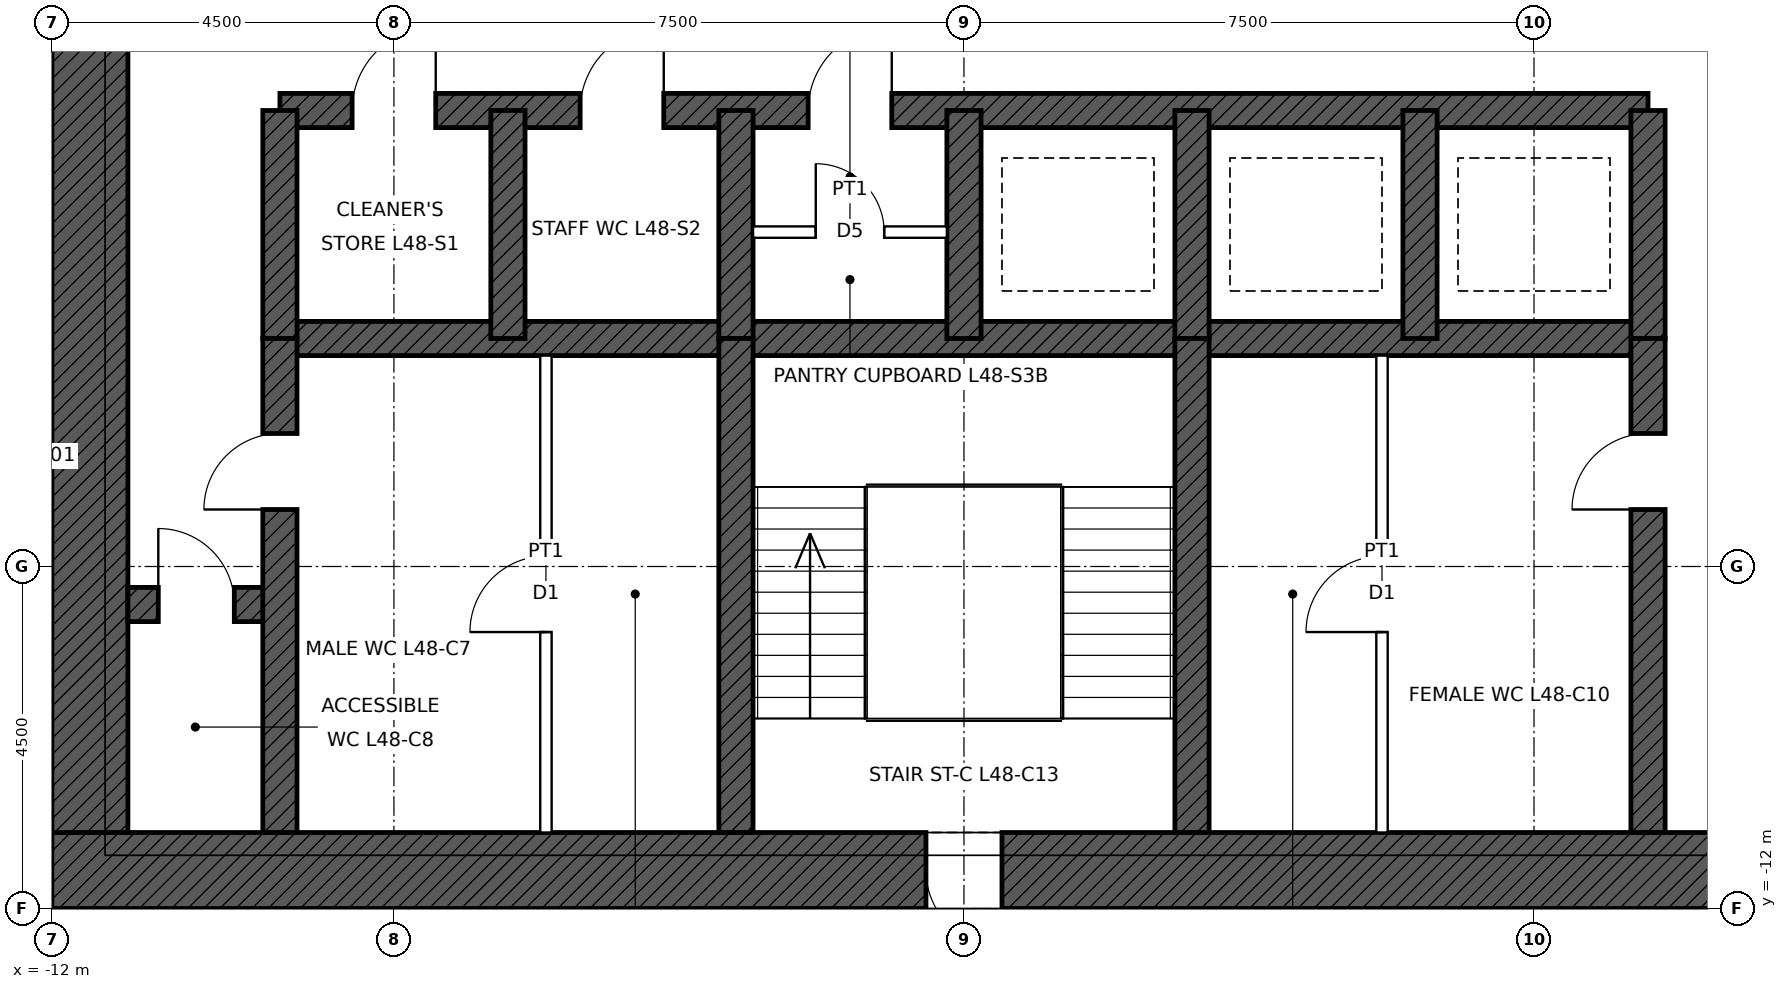
"""IFC4 building model, lengths in metres.
Left out: names, types, materials, properties, quantities, classifications, styles, units other than length and angle.
Written with IfcOpenShell. Run it as: python <this file> out.ifc"""

import sys

from ifc_helpers import new_model, si_unit, direction, frame, frame_2d, origin, place, context, subcontext, project, spatial, rectangle, extrude, element, fill, save


model = new_model("IFC4")
c1 = context("Model", 3, precision=1e-05, world=origin(), true_north=direction((0.0, 1.0)))
c2 = subcontext(c1, "Body", "Model", "MODEL_VIEW")
j1 = project(units=[si_unit("LENGTHUNIT", "METRE"), si_unit("PLANEANGLEUNIT", "RADIAN")], contexts=[c1])
p1 = place(None, origin())
s1 = spatial("IfcSite", under=j1, at=p1, CompositionType="ELEMENT")
p2 = place(p1, origin())
s2 = spatial("IfcBuilding", under=s1, at=p2, CompositionType="ELEMENT")
p3 = place(p2, frame((0.0, 0.0, 225.9)))
s3 = spatial("IfcBuildingStorey", under=s2, at=p3, CompositionType="ELEMENT", Elevation=225.9)
p4 = place(p3, frame((12.0, -11.5, 0.0), z_axis=(0.0, 0.0, 1.0), x_axis=(-1.0, 0.0, 0.0)))
e1 = element("IfcWall", 1, at=p4, inside=s3, PredefinedType="SHEAR", context=c2, shape_type="SweptSolid", body=[
    extrude(rectangle(XDim=24.0, YDim=1.0, at=frame_2d((12.0, 0.0))), origin(), (0.0, 0.0, 1.0), 4.0),
])
p5 = place(p4, frame((11.5, 0.0, 0.0)))
e2 = element("IfcOpeningElement", 2, at=p5, cuts=e1, PredefinedType="OPENING", context=c2, shape_type="SweptSolid", body=[
    extrude(rectangle(XDim=1.0, YDim=2.1, at=frame_2d((0.5, 1.05))), frame((0.0, 0.51, 0.0), z_axis=(0.0, -1.0, 0.0), x_axis=(1.0, 0.0, 0.0)), (0.0, 0.0, 1.0), 1.02),
])
p6 = place(p4, frame((1.0, 0.0, 0.0)))
e3 = element("IfcOpeningElement", 3, at=p6, cuts=e1, PredefinedType="OPENING", context=c2, shape_type="SweptSolid", body=[
    extrude(rectangle(XDim=1.0, YDim=2.4, at=frame_2d((0.5, 1.2))), frame((0.0, 0.51, 0.0), z_axis=(0.0, -1.0, 0.0), x_axis=(1.0, 0.0, 0.0)), (0.0, 0.0, 1.0), 1.02),
])
p7 = place(p3, frame((-11.5, -11.0, 0.0), z_axis=(0.0, 0.0, 1.0), x_axis=(0.0, 1.0, 0.0)))
e4 = element("IfcWall", 4, at=p7, inside=s3, PredefinedType="SHEAR", context=c2, shape_type="SweptSolid", body=[
    extrude(rectangle(XDim=22.0, YDim=1.0, at=frame_2d((11.0, 0.0))), origin(), (0.0, 0.0, 1.0), 4.0),
])
p8 = place(p7, frame((10.5, 0.0, 0.0)))
e5 = element("IfcOpeningElement", 5, at=p8, cuts=e4, PredefinedType="OPENING", context=c2, shape_type="SweptSolid", body=[
    extrude(rectangle(XDim=1.0, YDim=2.4, at=frame_2d((0.5, 1.2))), frame((0.0, 0.51, 0.0), z_axis=(0.0, -1.0, 0.0), x_axis=(1.0, 0.0, 0.0)), (0.0, 0.0, 1.0), 1.02),
])
p9 = place(p3, frame((-9.0, -1.5, 0.0), z_axis=(0.0, 0.0, 1.0), x_axis=(1.0, 0.0, 0.0)))
e6 = element("IfcWall", 6, at=p9, inside=s3, PredefinedType="SHEAR", context=c2, shape_type="SweptSolid", body=[
    extrude(rectangle(XDim=18.0, YDim=0.45, at=frame_2d((9.0, 0.0))), origin(), (0.0, 0.0, 1.0), 4.0),
])
p10 = place(p9, frame((0.95, 0.0, 0.0)))
e7 = element("IfcOpeningElement", 7, at=p10, cuts=e6, PredefinedType="OPENING", context=c2, shape_type="SweptSolid", body=[
    extrude(rectangle(XDim=1.1, YDim=2.1, at=frame_2d((0.55, 1.05))), frame((0.0, 0.235, 0.0), z_axis=(0.0, -1.0, 0.0), x_axis=(1.0, 0.0, 0.0)), (0.0, 0.0, 1.0), 0.47),
])
p11 = place(p9, frame((3.95, 0.0, 0.0)))
e8 = element("IfcOpeningElement", 8, at=p11, cuts=e6, PredefinedType="OPENING", context=c2, shape_type="SweptSolid", body=[
    extrude(rectangle(XDim=1.1, YDim=2.1, at=frame_2d((0.55, 1.05))), frame((0.0, 0.235, 0.0), z_axis=(0.0, -1.0, 0.0), x_axis=(1.0, 0.0, 0.0)), (0.0, 0.0, 1.0), 0.47),
])
p12 = place(p9, frame((6.95, 0.0, 0.0)))
e9 = element("IfcOpeningElement", 9, at=p12, cuts=e6, PredefinedType="OPENING", context=c2, shape_type="SweptSolid", body=[
    extrude(rectangle(XDim=1.1, YDim=2.1, at=frame_2d((0.55, 1.05))), frame((0.0, 0.235, 0.0), z_axis=(0.0, -1.0, 0.0), x_axis=(1.0, 0.0, 0.0)), (0.0, 0.0, 1.0), 0.47),
])
p13 = place(p3, frame((-9.0, -4.5, 0.0), z_axis=(0.0, 0.0, 1.0), x_axis=(1.0, 0.0, 0.0)))
e10 = element("IfcWall", 10, at=p13, inside=s3, PredefinedType="SHEAR", context=c2, shape_type="SweptSolid", body=[
    extrude(rectangle(XDim=18.0, YDim=0.45, at=frame_2d((9.0, 0.0))), origin(), (0.0, 0.0, 1.0), 4.0),
])
p14 = place(p3, frame((-11.0, -8.0, 0.0), z_axis=(0.0, 0.0, 1.0), x_axis=(1.0, 0.0, 0.0)))
e11 = element("IfcWall", 11, at=p14, inside=s3, PredefinedType="SHEAR", context=c2, shape_type="SweptSolid", body=[
    extrude(rectangle(XDim=2.0, YDim=0.45, at=frame_2d((1.0, 0.0))), origin(), (0.0, 0.0, 1.0), 4.0),
])
p15 = place(p14, frame((0.4, 0.0, 0.0)))
e12 = element("IfcOpeningElement", 12, at=p15, cuts=e11, PredefinedType="OPENING", context=c2, shape_type="SweptSolid", body=[
    extrude(rectangle(XDim=1.0, YDim=2.1, at=frame_2d((0.5, 1.05))), frame((0.0, 0.235, 0.0), z_axis=(0.0, -1.0, 0.0), x_axis=(1.0, 0.0, 0.0)), (0.0, 0.0, 1.0), 0.47),
])
for number, where, z_axis, x_axis in (
    (13, (-9.0, -4.5, 0.0), (0.0, 0.0, 1.0), (0.0, 1.0, 0.0)),
    (14, (9.0, -4.5, 0.0), (0.0, 0.0, 1.0), (0.0, 1.0, 0.0)),
    (15, (-6.0, -4.5, 0.0), (0.0, 0.0, 1.0), (0.0, 1.0, 0.0)),
    (16, (-3.0, -4.5, 0.0), (0.0, 0.0, 1.0), (0.0, 1.0, 0.0)),
    (17, (0.0, -4.5, 0.0), (0.0, 0.0, 1.0), (0.0, 1.0, 0.0)),
    (18, (3.0, -4.5, 0.0), (0.0, 0.0, 1.0), (0.0, 1.0, 0.0)),
    (19, (6.0, -4.5, 0.0), (0.0, 0.0, 1.0), (0.0, 1.0, 0.0)),
):
    element("IfcWall", number, at=place(p3, frame(where, z_axis=z_axis, x_axis=x_axis)), inside=s3, PredefinedType="SHEAR", context=c2, shape_type="SweptSolid", body=[
        extrude(rectangle(XDim=3.0, YDim=0.45, at=frame_2d((1.5, 0.0))), origin(), (0.0, 0.0, 1.0), 4.0),
    ])
p16 = place(p3, frame((-9.0, -11.0, 0.0), z_axis=(0.0, 0.0, 1.0), x_axis=(0.0, 1.0, 0.0)))
e20 = element("IfcWall", 20, at=p16, inside=s3, PredefinedType="SHEAR", context=c2, shape_type="SweptSolid", body=[
    extrude(rectangle(XDim=6.5, YDim=0.45, at=frame_2d((3.25, 0.0))), origin(), (0.0, 0.0, 1.0), 4.0),
])
p17 = place(p16, frame((4.25, 0.0, 0.0)))
e21 = element("IfcOpeningElement", 21, at=p17, cuts=e20, PredefinedType="OPENING", context=c2, shape_type="SweptSolid", body=[
    extrude(rectangle(XDim=1.0, YDim=2.1, at=frame_2d((0.5, 1.05))), frame((0.0, 0.235, 0.0), z_axis=(0.0, -1.0, 0.0), x_axis=(1.0, 0.0, 0.0)), (0.0, 0.0, 1.0), 0.47),
])
p18 = place(p3, frame((9.0, -11.0, 0.0), z_axis=(0.0, 0.0, 1.0), x_axis=(0.0, 1.0, 0.0)))
e22 = element("IfcWall", 22, at=p18, inside=s3, PredefinedType="SHEAR", context=c2, shape_type="SweptSolid", body=[
    extrude(rectangle(XDim=6.5, YDim=0.45, at=frame_2d((3.25, 0.0))), origin(), (0.0, 0.0, 1.0), 4.0),
])
p19 = place(p18, frame((4.25, 0.0, 0.0)))
e23 = element("IfcOpeningElement", 23, at=p19, cuts=e22, PredefinedType="OPENING", context=c2, shape_type="SweptSolid", body=[
    extrude(rectangle(XDim=1.0, YDim=2.1, at=frame_2d((0.5, 1.05))), frame((0.0, 0.235, 0.0), z_axis=(0.0, -1.0, 0.0), x_axis=(1.0, 0.0, 0.0)), (0.0, 0.0, 1.0), 0.47),
])
for number, where, z_axis, x_axis in (
    (24, (-3.0, -11.0, 0.0), (0.0, 0.0, 1.0), (0.0, 1.0, 0.0)),
    (25, (3.0, -11.0, 0.0), (0.0, 0.0, 1.0), (0.0, 1.0, 0.0)),
):
    element("IfcWall", number, at=place(p3, frame(where, z_axis=z_axis, x_axis=x_axis)), inside=s3, PredefinedType="SHEAR", context=c2, shape_type="SweptSolid", body=[
        extrude(rectangle(XDim=6.5, YDim=0.45, at=frame_2d((3.25, 0.0))), origin(), (0.0, 0.0, 1.0), 4.0),
    ])
p20 = place(p3, frame((-5.5, -11.0, 0.0), z_axis=(0.0, 0.0, 1.0), x_axis=(0.0, 1.0, 0.0)))
e26 = element("IfcWall", 26, at=p20, inside=s3, PredefinedType="PARTITIONING", context=c2, shape_type="SweptSolid", body=[
    extrude(rectangle(XDim=6.275, YDim=0.15, at=frame_2d((3.137, 0.0))), origin(), (0.0, 0.0, 1.0), 3.75),
])
p21 = place(p20, frame((2.637, 0.0, 0.0)))
e27 = element("IfcOpeningElement", 27, at=p21, cuts=e26, PredefinedType="OPENING", context=c2, shape_type="SweptSolid", body=[
    extrude(rectangle(XDim=1.0, YDim=2.1, at=frame_2d((0.5, 1.05))), frame((0.0, 0.085, 0.0), z_axis=(0.0, -1.0, 0.0), x_axis=(1.0, 0.0, 0.0)), (0.0, 0.0, 1.0), 0.17),
])
p22 = place(p3, frame((5.5, -11.0, 0.0), z_axis=(0.0, 0.0, 1.0), x_axis=(0.0, 1.0, 0.0)))
e28 = element("IfcWall", 28, at=p22, inside=s3, PredefinedType="PARTITIONING", context=c2, shape_type="SweptSolid", body=[
    extrude(rectangle(XDim=6.275, YDim=0.15, at=frame_2d((3.137, 0.0))), origin(), (0.0, 0.0, 1.0), 3.75),
])
p23 = place(p22, frame((2.637, 0.0, 0.0)))
e29 = element("IfcOpeningElement", 29, at=p23, cuts=e28, PredefinedType="OPENING", context=c2, shape_type="SweptSolid", body=[
    extrude(rectangle(XDim=1.0, YDim=2.1, at=frame_2d((0.5, 1.05))), frame((0.0, 0.085, 0.0), z_axis=(0.0, -1.0, 0.0), x_axis=(1.0, 0.0, 0.0)), (0.0, 0.0, 1.0), 0.17),
])
p24 = place(p3, frame((-2.775, -3.1, 0.0), z_axis=(0.0, 0.0, 1.0), x_axis=(1.0, 0.0, 0.0)))
e30 = element("IfcWall", 30, at=p24, inside=s3, PredefinedType="PARTITIONING", context=c2, shape_type="SweptSolid", body=[
    extrude(rectangle(XDim=2.55, YDim=0.15, at=frame_2d((1.275, 0.0))), origin(), (0.0, 0.0, 1.0), 3.75),
])
p25 = place(p24, frame((0.825, 0.0, 0.0)))
e31 = element("IfcOpeningElement", 31, at=p25, cuts=e30, PredefinedType="OPENING", context=c2, shape_type="SweptSolid", body=[
    extrude(rectangle(XDim=0.9, YDim=2.1, at=frame_2d((0.45, 1.05))), frame((0.0, 0.085, 0.0), z_axis=(0.0, -1.0, 0.0), x_axis=(1.0, 0.0, 0.0)), (0.0, 0.0, 1.0), 0.17),
])
p26 = place(p5, origin())
e32 = element("IfcDoor", 32, at=p26, inside=s3, OperationType="SINGLE_SWING_LEFT", PredefinedType="DOOR", context=c2, shape_type="SweptSolid", body=[
    extrude(rectangle(XDim=1.0, YDim=2.1, at=frame_2d((0.5, 1.05))), frame((0.0, 0.485, 0.0), z_axis=(0.0, -1.0, 0.0), x_axis=(1.0, 0.0, 0.0)), (0.0, 0.0, 1.0), 0.05),
])
fill(e2, e32)
p27 = place(p17, origin())
e33 = element("IfcDoor", 33, at=p27, inside=s3, OperationType="SINGLE_SWING_LEFT", PredefinedType="DOOR", context=c2, shape_type="SweptSolid", body=[
    extrude(rectangle(XDim=1.0, YDim=2.1, at=frame_2d((0.5, 1.05))), frame((0.0, 0.025, 0.0), z_axis=(0.0, -1.0, 0.0), x_axis=(1.0, 0.0, 0.0)), (0.0, 0.0, 1.0), 0.05),
])
fill(e21, e33)
p28 = place(p19, origin())
e34 = element("IfcDoor", 34, at=p28, inside=s3, OperationType="SINGLE_SWING_LEFT", PredefinedType="DOOR", context=c2, shape_type="SweptSolid", body=[
    extrude(rectangle(XDim=1.0, YDim=2.1, at=frame_2d((0.5, 1.05))), frame((0.0, 0.025, 0.0), z_axis=(0.0, -1.0, 0.0), x_axis=(1.0, 0.0, 0.0)), (0.0, 0.0, 1.0), 0.05),
])
fill(e23, e34)
p29 = place(p15, origin())
e35 = element("IfcDoor", 35, at=p29, inside=s3, OperationType="SINGLE_SWING_LEFT", PredefinedType="DOOR", context=c2, shape_type="SweptSolid", body=[
    extrude(rectangle(XDim=1.0, YDim=2.1, at=frame_2d((0.5, 1.05))), frame((0.0, 0.025, 0.0), z_axis=(0.0, -1.0, 0.0), x_axis=(1.0, 0.0, 0.0)), (0.0, 0.0, 1.0), 0.05),
])
fill(e12, e35)
p30 = place(p21, origin())
e36 = element("IfcDoor", 36, at=p30, inside=s3, OperationType="SINGLE_SWING_LEFT", PredefinedType="DOOR", context=c2, shape_type="SweptSolid", body=[
    extrude(rectangle(XDim=1.0, YDim=2.1, at=frame_2d((0.5, 1.05))), frame((0.0, 0.025, 0.0), z_axis=(0.0, -1.0, 0.0), x_axis=(1.0, 0.0, 0.0)), (0.0, 0.0, 1.0), 0.05),
])
fill(e27, e36)
p31 = place(p23, origin())
e37 = element("IfcDoor", 37, at=p31, inside=s3, OperationType="SINGLE_SWING_LEFT", PredefinedType="DOOR", context=c2, shape_type="SweptSolid", body=[
    extrude(rectangle(XDim=1.0, YDim=2.1, at=frame_2d((0.5, 1.05))), frame((0.0, 0.025, 0.0), z_axis=(0.0, -1.0, 0.0), x_axis=(1.0, 0.0, 0.0)), (0.0, 0.0, 1.0), 0.05),
])
fill(e29, e37)
p32 = place(p10, origin())
e38 = element("IfcDoor", 38, at=p32, inside=s3, OperationType="SINGLE_SWING_RIGHT", PredefinedType="DOOR", context=c2, shape_type="SweptSolid", body=[
    extrude(rectangle(XDim=1.1, YDim=2.1, at=frame_2d((0.55, 1.05))), frame((0.0, 0.025, 0.0), z_axis=(0.0, -1.0, 0.0), x_axis=(1.0, 0.0, 0.0)), (0.0, 0.0, 1.0), 0.05),
])
fill(e7, e38)
p33 = place(p11, origin())
e39 = element("IfcDoor", 39, at=p33, inside=s3, OperationType="SINGLE_SWING_RIGHT", PredefinedType="DOOR", context=c2, shape_type="SweptSolid", body=[
    extrude(rectangle(XDim=1.1, YDim=2.1, at=frame_2d((0.55, 1.05))), frame((0.0, 0.025, 0.0), z_axis=(0.0, -1.0, 0.0), x_axis=(1.0, 0.0, 0.0)), (0.0, 0.0, 1.0), 0.05),
])
fill(e8, e39)
p34 = place(p12, origin())
e40 = element("IfcDoor", 40, at=p34, inside=s3, OperationType="SINGLE_SWING_RIGHT", PredefinedType="DOOR", context=c2, shape_type="SweptSolid", body=[
    extrude(rectangle(XDim=1.1, YDim=2.1, at=frame_2d((0.55, 1.05))), frame((0.0, 0.025, 0.0), z_axis=(0.0, -1.0, 0.0), x_axis=(1.0, 0.0, 0.0)), (0.0, 0.0, 1.0), 0.05),
])
fill(e9, e40)
p35 = place(p25, origin())
e41 = element("IfcDoor", 41, at=p35, inside=s3, OperationType="SINGLE_SWING_LEFT", PredefinedType="DOOR", context=c2, shape_type="SweptSolid", body=[
    extrude(rectangle(XDim=0.9, YDim=2.1, at=frame_2d((0.45, 1.05))), frame((0.0, 0.025, 0.0), z_axis=(0.0, -1.0, 0.0), x_axis=(1.0, 0.0, 0.0)), (0.0, 0.0, 1.0), 0.05),
])
fill(e31, e41)
save(model, sys.argv[1])
